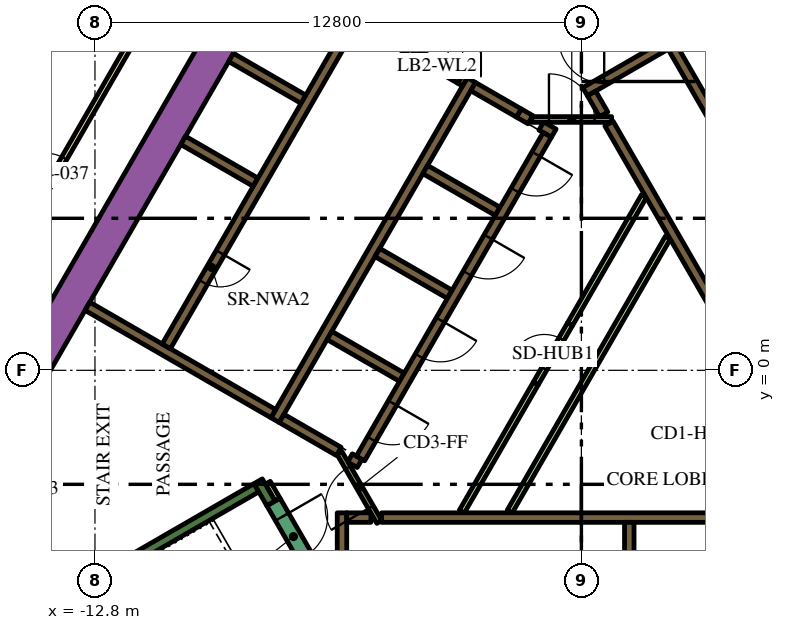
"""IFC4 building model, lengths in metres.
Left out: names, types, materials, properties, quantities, classifications, styles, units other than length and angle.
Written with IfcOpenShell. Run it as: python <this file> out.ifc"""

import sys

from ifc_helpers import new_model, si_unit, direction, frame, frame_2d, origin, place, context, subcontext, project, spatial, polyline, rectangle, outline, extrude, element, fill, save


model = new_model("IFC4")
c1 = context("Model", 3, precision=1e-05, world=origin(), true_north=direction((0.0, 1.0)))
c2 = subcontext(c1, "Body", "Model", "MODEL_VIEW")
j1 = project(units=[si_unit("LENGTHUNIT", "METRE"), si_unit("PLANEANGLEUNIT", "RADIAN")], contexts=[c1])
p1 = place(None, origin())
s1 = spatial("IfcSite", under=j1, at=p1, CompositionType="ELEMENT")
p2 = place(p1, origin())
s2 = spatial("IfcBuilding", under=s1, at=p2, CompositionType="ELEMENT")
p3 = place(p2, frame((0.0, 0.0, 66.6)))
s3 = spatial("IfcBuildingStorey", under=s2, at=p3, CompositionType="ELEMENT", Elevation=66.6)
p4 = place(p3, frame((-15.36, -1.503, 0.0), z_axis=(0.0, 0.0, 1.0), x_axis=(0.50000389221, 0.866023156604, 0.0)))
e1 = element("IfcWall", 1, at=p4, inside=s3, PredefinedType="SOLIDWALL", context=c2, shape_type="SweptSolid", body=[
    extrude(rectangle(XDim=21.0, YDim=0.9, at=frame_2d((10.5, 0.0))), origin(), (0.0, 0.0, 1.0), 3.9),
])
p5 = place(p3, frame((-12.134, -11.883, 0.0), z_axis=(0.0, 0.0, 1.0), x_axis=(-0.500005339912, 0.866022320763, 0.0)))
e2 = element("IfcWall", 2, at=p5, inside=s3, PredefinedType="SOLIDWALL", context=c2, shape_type="SweptSolid", body=[
    extrude(rectangle(XDim=9.488, YDim=0.9, at=frame_2d((4.744, 0.0))), origin(), (0.0, 0.0, 1.0), 3.9),
])
p6 = place(p3, frame((-14.44, -6.49, 0.0), z_axis=(0.0, 0.0, 1.0), x_axis=(0.866022966069, 0.500004222222, 0.0)))
e3 = element("IfcWall", 3, at=p6, inside=s3, PredefinedType="SOLIDWALL", context=c2, shape_type="SweptSolid", body=[
    extrude(rectangle(XDim=6.8, YDim=0.25, at=frame_2d((3.4, 0.0))), origin(), (0.0, 0.0, 1.0), 3.9),
])
p7 = place(p3, frame((-8.168, -3.503, 0.0), z_axis=(0.0, 0.0, 1.0), x_axis=(-0.499952099219, 0.866053057547, 0.0)))
e4 = element("IfcWall", 4, at=p7, inside=s3, PredefinedType="SOLIDWALL", context=c2, shape_type="SweptSolid", body=[
    extrude(rectangle(XDim=0.675, YDim=0.25, at=frame_2d((0.337, 0.0))), origin(), (0.0, 0.0, 1.0), 3.9),
])
p8 = place(p3, frame((-5.259, -3.875, 0.0), z_axis=(0.0, 0.0, 1.0), x_axis=(1.0, 0.0, 0.0)))
e5 = element("IfcWall", 5, at=p8, inside=s3, PredefinedType="SOLIDWALL", context=c2, shape_type="SweptSolid", body=[
    extrude(rectangle(XDim=10.489, YDim=0.25, at=frame_2d((5.244, 0.0))), origin(), (0.0, 0.0, 1.0), 3.9),
])
p9 = place(p3, frame((1.26, -4.0, 0.0), z_axis=(0.0, 0.0, 1.0), x_axis=(0.0, -1.0, 0.0)))
e6 = element("IfcWall", 6, at=p9, inside=s3, PredefinedType="SOLIDWALL", context=c2, shape_type="SweptSolid", body=[
    extrude(rectangle(XDim=2.2, YDim=0.25, at=frame_2d((1.1, 0.0))), origin(), (0.0, 0.0, 1.0), 3.9),
])
p10 = place(p3, frame((-6.3, -7.035, 0.0), z_axis=(0.0, 0.0, 1.0), x_axis=(0.0, 1.0, 0.0)))
e7 = element("IfcWall", 7, at=p10, inside=s3, PredefinedType="SOLIDWALL", context=c2, shape_type="SweptSolid", body=[
    extrude(rectangle(XDim=3.285, YDim=0.25, at=frame_2d((1.643, 0.0))), origin(), (0.0, 0.0, 1.0), 3.9),
])
p11 = place(p3, frame((-6.175, -3.875, 0.0), z_axis=(0.0, 0.0, 1.0), x_axis=(1.0, 0.0, 0.0)))
e8 = element("IfcWall", 8, at=p11, inside=s3, PredefinedType="SOLIDWALL", context=c2, shape_type="SweptSolid", body=[
    extrude(rectangle(XDim=0.637, YDim=0.25, at=frame_2d((0.318, 0.0))), origin(), (0.0, 0.0, 1.0), 3.9),
])
p12 = place(p3, frame((0.098, 7.331, 0.0), z_axis=(0.0, 0.0, 1.0), x_axis=(0.865988154826, 0.50006451154, 0.0)))
e9 = element("IfcWall", 9, at=p12, inside=s3, PredefinedType="SOLIDWALL", context=c2, shape_type="SweptSolid", body=[
    extrude(rectangle(XDim=3.398, YDim=0.25, at=frame_2d((1.699, 0.0))), origin(), (0.0, 0.0, 1.0), 3.9),
])
p13 = place(p3, frame((0.268, 7.285, 0.0), z_axis=(0.0, 0.0, 1.0), x_axis=(0.500098681536, -0.865968422476, 0.0)))
e10 = element("IfcWall", 10, at=p13, inside=s3, PredefinedType="SOLIDWALL", context=c2, shape_type="SweptSolid", body=[
    extrude(rectangle(XDim=0.636, YDim=0.25, at=frame_2d((0.318, 0.0))), origin(), (0.0, 0.0, 1.0), 3.9),
])
p14 = place(p3, frame((5.97, -2.591, 0.0), z_axis=(0.0, 0.0, 1.0), x_axis=(-0.499994469932, 0.866028596547, 0.0)))
e11 = element("IfcWall", 11, at=p14, inside=s3, PredefinedType="SOLIDWALL", context=c2, shape_type="SweptSolid", body=[
    extrude(rectangle(XDim=10.488, YDim=0.25, at=frame_2d((5.244, 0.0))), origin(), (0.0, 0.0, 1.0), 3.9),
])
p15 = place(p3, frame((-8.06, -1.311, 0.0), z_axis=(0.0, 0.0, 1.0), x_axis=(0.50000273126, 0.866023826885, 0.0)))
e12 = element("IfcWall", 12, at=p15, inside=s3, PredefinedType="SOLIDWALL", context=c2, shape_type="SweptSolid", body=[
    extrude(rectangle(XDim=10.33, YDim=0.25, at=frame_2d((5.165, 0.0))), origin(), (0.0, 0.0, 1.0), 3.9),
])
p16 = place(p3, frame((-1.342, 6.595, 0.0), z_axis=(0.0, 0.0, 1.0), x_axis=(-0.866046247233, 0.49996389635, 0.0)))
e13 = element("IfcWall", 13, at=p16, inside=s3, PredefinedType="SOLIDWALL", context=c2, shape_type="SweptSolid", body=[
    extrude(rectangle(XDim=0.35, YDim=0.25, at=frame_2d((0.175, 0.0))), origin(), (0.0, 0.0, 1.0), 3.9),
])
p17 = place(p3, frame((-1.647, 6.771, 0.0), z_axis=(0.0, 0.0, 1.0), x_axis=(-0.865971728693, 0.500092956464, 0.0)))
e14 = element("IfcWall", 14, at=p17, inside=s3, PredefinedType="SOLIDWALL", context=c2, shape_type="SweptSolid", body=[
    extrude(rectangle(XDim=1.388, YDim=0.25, at=frame_2d((0.694, 0.0))), origin(), (0.0, 0.0, 1.0), 3.9),
])
p18 = place(p3, frame((-0.728, 6.24, 0.0), z_axis=(0.0, 0.0, 1.0), x_axis=(-0.866088799389, 0.499890179513, 0.0)))
e15 = element("IfcWall", 15, at=p18, inside=s3, PredefinedType="SOLIDWALL", context=c2, shape_type="SweptSolid", body=[
    extrude(rectangle(XDim=0.378, YDim=0.25, at=frame_2d((0.189, 0.0))), origin(), (0.0, 0.0, 1.0), 3.9),
])
for number, where, z_axis, x_axis in (
    (16, (-2.204, 4.182, 0.0), (0.0, 0.0, 1.0), (-0.866, 0.5, 0.0)),
    (17, (-5.369, 3.1, 0.0), (0.0, 0.0, 1.0), (0.866, -0.5, 0.0)),
    (18, (-4.724, -0.182, 0.0), (0.0, 0.0, 1.0), (-0.866, 0.5, 0.0)),
):
    element("IfcWall", number, at=place(p3, frame(where, z_axis=z_axis, x_axis=x_axis)), inside=s3, PredefinedType="SOLIDWALL", context=c2, shape_type="SweptSolid", body=[
        extrude(rectangle(XDim=2.2, YDim=0.25, at=frame_2d((1.1, 0.0))), origin(), (0.0, 0.0, 1.0), 3.9),
    ])
p19 = place(p3, frame((-6.088, -2.305, 0.0), z_axis=(0.0, 0.0, 1.0), x_axis=(0.866059450854, -0.499941024108, 0.0)))
e19 = element("IfcWall", 19, at=p19, inside=s3, PredefinedType="SOLIDWALL", context=c2, shape_type="SweptSolid", body=[
    extrude(rectangle(XDim=0.29, YDim=0.25, at=frame_2d((0.145, 0.0))), origin(), (0.0, 0.0, 1.0), 3.9),
])
p20 = place(p3, frame((-7.889, -1.265, 0.0), z_axis=(0.0, 0.0, 1.0), x_axis=(0.865986741702, -0.500066958712, 0.0)))
e20 = element("IfcWall", 20, at=p20, inside=s3, PredefinedType="SOLIDWALL", context=c2, shape_type="SweptSolid", body=[
    extrude(rectangle(XDim=1.738, YDim=0.25, at=frame_2d((0.869, 0.0))), origin(), (0.0, 0.0, 1.0), 3.9),
])
p21 = place(p3, frame((-8.106, -1.14, 0.0), z_axis=(0.0, 0.0, 1.0), x_axis=(-0.866000643155, 0.500042884217, 0.0)))
e21 = element("IfcWall", 21, at=p21, inside=s3, PredefinedType="SOLIDWALL", context=c2, shape_type="SweptSolid", body=[
    extrude(rectangle(XDim=5.65, YDim=0.25, at=frame_2d((2.825, 0.0))), origin(), (0.0, 0.0, 1.0), 3.9),
])
p22 = place(p3, origin())
e22 = element("IfcWall", 22, at=p22, inside=s3, PredefinedType="SOLIDWALL", context=c2, shape_type="SweptSolid", body=[
    extrude(outline(polyline([(-3.128, 7.481), (-3.259, 7.557), (-3.134, 7.773), (-3.003, 7.698), (-3.128, 7.481)])), origin(), (0.0, 0.0, 1.0), 3.9),
])
for number, where, z_axis, x_axis in (
    (23, (-8.574, 4.95, 0.0), (0.0, 0.0, 1.0), (-0.866, 0.5, 0.0)),
    (24, (-7.314, 7.132, 0.0), (0.0, 0.0, 1.0), (-0.866, 0.5, 0.0)),
):
    element("IfcWall", number, at=place(p3, frame(where, z_axis=z_axis, x_axis=x_axis)), inside=s3, PredefinedType="SOLIDWALL", context=c2, shape_type="SweptSolid", body=[
        extrude(rectangle(XDim=2.2, YDim=0.25, at=frame_2d((1.1, 0.0))), origin(), (0.0, 0.0, 1.0), 3.9),
    ])
p23 = place(p3, frame((-7.959, 10.415, 0.0), z_axis=(0.0, 0.0, 1.0), x_axis=(0.866020958405, -0.500007699544, 0.0)))
e25 = element("IfcWall", 25, at=p23, inside=s3, PredefinedType="SOLIDWALL", context=c2, shape_type="SweptSolid", body=[
    extrude(rectangle(XDim=4.1, YDim=0.25, at=frame_2d((2.05, 0.0))), origin(), (0.0, 0.0, 1.0), 3.9),
])
p24 = place(p3, frame((-8.252, -2.958, 0.0), z_axis=(0.0, 0.0, 1.0), x_axis=(0.500174715838, -0.865924508047, 0.0)))
e26 = element("IfcWall", 26, at=p24, inside=s3, PredefinedType="PARTITIONING", context=c2, shape_type="SweptSolid", body=[
    extrude(rectangle(XDim=0.514, YDim=0.15, at=frame_2d((0.257, 0.0))), origin(), (0.0, 0.0, 1.0), 2.75),
])
p25 = place(p3, frame((-3.147, -3.718, 0.0), z_axis=(0.0, 0.0, 1.0), x_axis=(0.500010131483, 0.866019554291, 0.0)))
e27 = element("IfcWall", 27, at=p25, inside=s3, PredefinedType="PARTITIONING", context=c2, shape_type="SweptSolid", body=[
    extrude(rectangle(XDim=3.894, YDim=0.15, at=frame_2d((1.947, 0.0))), origin(), (0.0, 0.0, 1.0), 2.75),
])
p26 = place(p3, frame((-1.887, -3.718, 0.0), z_axis=(0.0, 0.0, 1.0), x_axis=(0.500005008002, 0.866022512394, 0.0)))
e28 = element("IfcWall", 28, at=p26, inside=s3, PredefinedType="PARTITIONING", context=c2, shape_type="SweptSolid", body=[
    extrude(rectangle(XDim=8.327, YDim=0.15, at=frame_2d((4.164, 0.0))), origin(), (0.0, 0.0, 1.0), 2.75),
])
p27 = place(p3, frame((-0.3, 1.212, 0.0), z_axis=(0.0, 0.0, 1.0), x_axis=(0.499963101113, 0.866046706318, 0.0)))
e29 = element("IfcWall", 29, at=p27, inside=s3, PredefinedType="PARTITIONING", context=c2, shape_type="SweptSolid", body=[
    extrude(rectangle(XDim=3.893, YDim=0.15, at=frame_2d((1.947, 0.0))), origin(), (0.0, 0.0, 1.0), 2.75),
])
p28 = place(p3, frame((8.565, -2.185, 0.0), z_axis=(0.0, 0.0, 1.0), x_axis=(-0.499997954832, 0.866026584559, 0.0)))
e30 = element("IfcWall", 30, at=p28, inside=s3, PredefinedType="SOLIDWALL", context=c2, shape_type="SweptSolid", body=[
    extrude(rectangle(XDim=12.35, YDim=0.25, at=frame_2d((6.175, 0.0))), origin(), (0.0, 0.0, 1.0), 3.9),
])
p29 = place(p28, frame((5.725, 0.0, 0.0)))
e31 = element("IfcOpeningElement", 31, at=p29, cuts=e30, PredefinedType="OPENING", context=c2, shape_type="SweptSolid", body=[
    extrude(rectangle(XDim=0.9, YDim=2.1, at=frame_2d((0.45, 1.05))), frame((0.0, 0.135, 0.0), z_axis=(0.0, -1.0, 0.0), x_axis=(1.0, 0.0, 0.0)), (0.0, 0.0, 1.0), 0.27),
])
p30 = place(p3, frame((-6.008, 9.144, 0.0), z_axis=(0.0, 0.0, 1.0), x_axis=(-0.500006956611, -0.866021387346, 0.0)))
e32 = element("IfcWall", 32, at=p30, inside=s3, PredefinedType="SOLIDWALL", context=c2, shape_type="SweptSolid", body=[
    extrude(rectangle(XDim=9.83, YDim=0.25, at=frame_2d((4.915, 0.0))), origin(), (0.0, 0.0, 1.0), 3.9),
])
p31 = place(p30, frame((6.985, 0.0, 0.0)))
e33 = element("IfcOpeningElement", 33, at=p31, cuts=e32, PredefinedType="OPENING", context=c2, shape_type="SweptSolid", body=[
    extrude(rectangle(XDim=0.9, YDim=2.1, at=frame_2d((0.45, 1.05))), frame((0.0, 0.135, 0.0), z_axis=(0.0, -1.0, 0.0), x_axis=(1.0, 0.0, 0.0)), (0.0, 0.0, 1.0), 0.27),
])
p32 = place(p3, frame((-0.898, 6.194, 0.0), z_axis=(0.0, 0.0, 1.0), x_axis=(-0.499996202215, -0.866027596426, 0.0)))
e34 = element("IfcWall", 34, at=p32, inside=s3, PredefinedType="SOLIDWALL", context=c2, shape_type="SweptSolid", body=[
    extrude(rectangle(XDim=9.83, YDim=0.25, at=frame_2d((4.915, 0.0))), origin(), (0.0, 0.0, 1.0), 3.9),
])
p33 = place(p32, frame((0.585, 0.0, 0.0)))
e35 = element("IfcOpeningElement", 35, at=p33, cuts=e34, PredefinedType="OPENING", context=c2, shape_type="SweptSolid", body=[
    extrude(rectangle(XDim=1.1, YDim=2.1, at=frame_2d((0.55, 1.05))), frame((0.0, 0.135, 0.0), z_axis=(0.0, -1.0, 0.0), x_axis=(1.0, 0.0, 0.0)), (0.0, 0.0, 1.0), 0.27),
])
p34 = place(p32, frame((3.105, 0.0, 0.0)))
e36 = element("IfcOpeningElement", 36, at=p34, cuts=e34, PredefinedType="OPENING", context=c2, shape_type="SweptSolid", body=[
    extrude(rectangle(XDim=1.1, YDim=2.1, at=frame_2d((0.55, 1.05))), frame((0.0, 0.135, 0.0), z_axis=(0.0, -1.0, 0.0), x_axis=(1.0, 0.0, 0.0)), (0.0, 0.0, 1.0), 0.27),
])
p35 = place(p32, frame((5.625, 0.0, 0.0)))
e37 = element("IfcOpeningElement", 37, at=p35, cuts=e34, PredefinedType="OPENING", context=c2, shape_type="SweptSolid", body=[
    extrude(rectangle(XDim=1.1, YDim=2.1, at=frame_2d((0.55, 1.05))), frame((0.0, 0.135, 0.0), z_axis=(0.0, -1.0, 0.0), x_axis=(1.0, 0.0, 0.0)), (0.0, 0.0, 1.0), 0.27),
])
p36 = place(p32, frame((8.145, 0.0, 0.0)))
e38 = element("IfcOpeningElement", 38, at=p36, cuts=e34, PredefinedType="OPENING", context=c2, shape_type="SweptSolid", body=[
    extrude(rectangle(XDim=1.1, YDim=2.1, at=frame_2d((0.55, 1.05))), frame((0.0, 0.135, 0.0), z_axis=(0.0, -1.0, 0.0), x_axis=(1.0, 0.0, 0.0)), (0.0, 0.0, 1.0), 0.27),
])
p37 = place(p3, frame((-8.103, -3.466, 0.0), z_axis=(0.0, 0.0, 1.0), x_axis=(0.500078061341, -0.865980330357, 0.0)))
e39 = element("IfcWall", 39, at=p37, inside=s3, PredefinedType="SOLIDWALL", context=c2, shape_type="SweptSolid", body=[
    extrude(rectangle(XDim=2.1, YDim=0.4, at=frame_2d((1.05, 0.0))), origin(), (0.0, 0.0, 1.0), 3.9),
])
p38 = place(p37, frame((0.45, 0.0, 0.0)))
e40 = element("IfcOpeningElement", 40, at=p38, cuts=e39, PredefinedType="OPENING", context=c2, shape_type="SweptSolid", body=[
    extrude(rectangle(XDim=1.2, YDim=2.1, at=frame_2d((0.6, 1.05))), frame((0.0, 0.21, 0.0), z_axis=(0.0, -1.0, 0.0), x_axis=(1.0, 0.0, 0.0)), (0.0, 0.0, 1.0), 0.42),
])
p39 = place(p3, frame((-1.303, 6.6, 0.0), z_axis=(0.0, 0.0, 1.0), x_axis=(1.0, 0.0, 0.0)))
e41 = element("IfcWall", 41, at=p39, inside=s3, PredefinedType="PARTITIONING", context=c2, shape_type="SweptSolid", body=[
    extrude(rectangle(XDim=2.1, YDim=0.15, at=frame_2d((1.05, 0.0))), origin(), (0.0, 0.0, 1.0), 3.9),
])
p40 = place(p39, frame((0.45, 0.0, 0.0)))
e42 = element("IfcOpeningElement", 42, at=p40, cuts=e41, PredefinedType="OPENING", context=c2, shape_type="SweptSolid", body=[
    extrude(rectangle(XDim=1.2, YDim=2.1, at=frame_2d((0.6, 1.05))), frame((0.0, 0.085, 0.0), z_axis=(0.0, -1.0, 0.0), x_axis=(1.0, 0.0, 0.0)), (0.0, 0.0, 1.0), 0.17),
])
p41 = place(p3, frame((-5.317, -3.99, 0.0), z_axis=(0.0, 0.0, 1.0), x_axis=(-0.500027713859, 0.866009402589, 0.0)))
e43 = element("IfcWall", 43, at=p41, inside=s3, PredefinedType="PARTITIONING", context=c2, shape_type="SweptSolid", body=[
    extrude(rectangle(XDim=2.1, YDim=0.15, at=frame_2d((1.05, 0.0))), origin(), (0.0, 0.0, 1.0), 3.9),
])
p42 = place(p41, frame((0.45, 0.0, 0.0)))
e44 = element("IfcOpeningElement", 44, at=p42, cuts=e43, PredefinedType="OPENING", context=c2, shape_type="SweptSolid", body=[
    extrude(rectangle(XDim=1.2, YDim=2.1, at=frame_2d((0.6, 1.05))), frame((0.0, 0.085, 0.0), z_axis=(0.0, -1.0, 0.0), x_axis=(1.0, 0.0, 0.0)), (0.0, 0.0, 1.0), 0.17),
])
p43 = place(p3, frame((-4.409, 8.365, 0.0), z_axis=(0.0, 0.0, 1.0), x_axis=(0.866034573852, -0.49998411664, 0.0)))
e45 = element("IfcWall", 45, at=p43, inside=s3, PredefinedType="SOLIDWALL", context=c2, shape_type="SweptSolid", body=[
    extrude(rectangle(XDim=1.4, YDim=0.25, at=frame_2d((0.7, 0.0))), origin(), (0.0, 0.0, 1.0), 3.9),
])
p44 = place(p43, frame((0.1, 0.0, 0.0)))
e46 = element("IfcOpeningElement", 46, at=p44, cuts=e45, PredefinedType="OPENING", context=c2, shape_type="SweptSolid", body=[
    extrude(rectangle(XDim=1.2, YDim=2.1, at=frame_2d((0.6, 1.05))), frame((0.0, 0.135, 0.0), z_axis=(0.0, -1.0, 0.0), x_axis=(1.0, 0.0, 0.0)), (0.0, 0.0, 1.0), 0.27),
])
p45 = place(p3, frame((-1.2, -0.346, 0.0), z_axis=(0.0, 0.0, 1.0), x_axis=(0.499961193289, 0.866047807691, 0.0)))
e47 = element("IfcWall", 47, at=p45, inside=s3, PredefinedType="PARTITIONING", context=c2, shape_type="SweptSolid", body=[
    extrude(rectangle(XDim=1.8, YDim=0.15, at=frame_2d((0.9, 0.0))), origin(), (0.0, 0.0, 1.0), 2.75),
])
p46 = place(p45, frame((0.45, 0.0, 0.0)))
e48 = element("IfcOpeningElement", 48, at=p46, cuts=e47, PredefinedType="OPENING", context=c2, shape_type="SweptSolid", body=[
    extrude(rectangle(XDim=0.9, YDim=2.1, at=frame_2d((0.45, 1.05))), frame((0.0, 0.085, 0.0), z_axis=(0.0, -1.0, 0.0), x_axis=(1.0, 0.0, 0.0)), (0.0, 0.0, 1.0), 0.17),
])
p47 = place(p3, frame((-19.081, -3.9, 0.0), z_axis=(0.0, 0.0, 1.0), x_axis=(0.499998313975, 0.866026377209, 0.0)))
e49 = element("IfcWall", 49, at=p47, inside=s3, PredefinedType="PARTITIONING", context=c2, shape_type="SweptSolid", body=[
    extrude(rectangle(XDim=25.766, YDim=0.15, at=frame_2d((12.883, 0.0))), origin(), (0.0, 0.0, 1.0), 2.75),
])
p48 = place(p47, frame((24.586, 0.0, 0.0)))
e50 = element("IfcOpeningElement", 50, at=p48, cuts=e49, PredefinedType="OPENING", context=c2, shape_type="SweptSolid", body=[
    extrude(rectangle(XDim=1.0, YDim=2.1, at=frame_2d((0.5, 1.05))), frame((0.0, 0.085, 0.0), z_axis=(0.0, -1.0, 0.0), x_axis=(1.0, 0.0, 0.0)), (0.0, 0.0, 1.0), 0.17),
])
p49 = place(p47, frame((9.948, 0.0, 0.0)))
e51 = element("IfcOpeningElement", 51, at=p49, cuts=e49, PredefinedType="OPENING", context=c2, shape_type="SweptSolid", body=[
    extrude(rectangle(XDim=1.0, YDim=2.1, at=frame_2d((0.5, 1.05))), frame((0.0, 0.085, 0.0), z_axis=(0.0, -1.0, 0.0), x_axis=(1.0, 0.0, 0.0)), (0.0, 0.0, 1.0), 0.17),
])
p50 = place(p47, frame((7.782, 0.0, 0.0)))
e52 = element("IfcOpeningElement", 52, at=p50, cuts=e49, PredefinedType="OPENING", context=c2, shape_type="SweptSolid", body=[
    extrude(rectangle(XDim=0.9, YDim=2.1, at=frame_2d((0.45, 1.05))), frame((0.0, 0.085, 0.0), z_axis=(0.0, -1.0, 0.0), x_axis=(1.0, 0.0, 0.0)), (0.0, 0.0, 1.0), 0.17),
])
p51 = place(p47, frame((4.658, 0.0, 0.0)))
e53 = element("IfcOpeningElement", 53, at=p51, cuts=e49, PredefinedType="OPENING", context=c2, shape_type="SweptSolid", body=[
    extrude(rectangle(XDim=0.9, YDim=2.1, at=frame_2d((0.45, 1.05))), frame((0.0, 0.085, 0.0), z_axis=(0.0, -1.0, 0.0), x_axis=(1.0, 0.0, 0.0)), (0.0, 0.0, 1.0), 0.17),
])
p52 = place(p31, origin())
e54 = element("IfcDoor", 54, at=p52, inside=s3, OperationType="SINGLE_SWING_LEFT", PredefinedType="DOOR", context=c2, shape_type="SweptSolid", body=[
    extrude(rectangle(XDim=0.9, YDim=2.1, at=frame_2d((0.45, 1.05))), frame((0.0, 0.025, 0.0), z_axis=(0.0, -1.0, 0.0), x_axis=(1.0, 0.0, 0.0)), (0.0, 0.0, 1.0), 0.05),
])
fill(e33, e54)
p53 = place(p33, origin())
e55 = element("IfcDoor", 55, at=p53, inside=s3, OperationType="DOUBLE_DOOR_SLIDING", PredefinedType="DOOR", context=c2, shape_type="SweptSolid", body=[
    extrude(rectangle(XDim=1.1, YDim=2.1, at=frame_2d((0.55, 1.05))), frame((0.0, 0.025, 0.0), z_axis=(0.0, -1.0, 0.0), x_axis=(1.0, 0.0, 0.0)), (0.0, 0.0, 1.0), 0.05),
])
fill(e35, e55)
p54 = place(p34, origin())
e56 = element("IfcDoor", 56, at=p54, inside=s3, OperationType="DOUBLE_DOOR_SLIDING", PredefinedType="DOOR", context=c2, shape_type="SweptSolid", body=[
    extrude(rectangle(XDim=1.1, YDim=2.1, at=frame_2d((0.55, 1.05))), frame((0.0, 0.025, 0.0), z_axis=(0.0, -1.0, 0.0), x_axis=(1.0, 0.0, 0.0)), (0.0, 0.0, 1.0), 0.05),
])
fill(e36, e56)
p55 = place(p35, origin())
e57 = element("IfcDoor", 57, at=p55, inside=s3, OperationType="DOUBLE_DOOR_SLIDING", PredefinedType="DOOR", context=c2, shape_type="SweptSolid", body=[
    extrude(rectangle(XDim=1.1, YDim=2.1, at=frame_2d((0.55, 1.05))), frame((0.0, 0.025, 0.0), z_axis=(0.0, -1.0, 0.0), x_axis=(1.0, 0.0, 0.0)), (0.0, 0.0, 1.0), 0.05),
])
fill(e37, e57)
p56 = place(p36, origin())
e58 = element("IfcDoor", 58, at=p56, inside=s3, OperationType="DOUBLE_DOOR_SLIDING", PredefinedType="DOOR", context=c2, shape_type="SweptSolid", body=[
    extrude(rectangle(XDim=1.1, YDim=2.1, at=frame_2d((0.55, 1.05))), frame((0.0, 0.025, 0.0), z_axis=(0.0, -1.0, 0.0), x_axis=(1.0, 0.0, 0.0)), (0.0, 0.0, 1.0), 0.05),
])
fill(e38, e58)
p57 = place(p38, origin())
e59 = element("IfcDoor", 59, at=p57, inside=s3, OperationType="SINGLE_SWING_LEFT", PredefinedType="DOOR", context=c2, shape_type="SweptSolid", body=[
    extrude(rectangle(XDim=1.2, YDim=2.1, at=frame_2d((0.6, 1.05))), frame((0.0, 0.025, 0.0), z_axis=(0.0, -1.0, 0.0), x_axis=(1.0, 0.0, 0.0)), (0.0, 0.0, 1.0), 0.05),
])
fill(e40, e59)
p58 = place(p40, origin())
e60 = element("IfcDoor", 60, at=p58, inside=s3, OperationType="SINGLE_SWING_LEFT", PredefinedType="DOOR", context=c2, shape_type="SweptSolid", body=[
    extrude(rectangle(XDim=1.2, YDim=2.1, at=frame_2d((0.6, 1.05))), frame((0.0, 0.025, 0.0), z_axis=(0.0, -1.0, 0.0), x_axis=(1.0, 0.0, 0.0)), (0.0, 0.0, 1.0), 0.05),
])
fill(e42, e60)
p59 = place(p42, origin())
e61 = element("IfcDoor", 61, at=p59, inside=s3, OperationType="SINGLE_SWING_LEFT", PredefinedType="DOOR", context=c2, shape_type="SweptSolid", body=[
    extrude(rectangle(XDim=1.2, YDim=2.1, at=frame_2d((0.6, 1.05))), frame((0.0, 0.025, 0.0), z_axis=(0.0, -1.0, 0.0), x_axis=(1.0, 0.0, 0.0)), (0.0, 0.0, 1.0), 0.05),
])
fill(e44, e61)
p60 = place(p44, origin())
e62 = element("IfcDoor", 62, at=p60, inside=s3, OperationType="SINGLE_SWING_LEFT", PredefinedType="DOOR", context=c2, shape_type="SweptSolid", body=[
    extrude(rectangle(XDim=1.2, YDim=2.1, at=frame_2d((0.6, 1.05))), frame((0.0, 0.025, 0.0), z_axis=(0.0, -1.0, 0.0), x_axis=(1.0, 0.0, 0.0)), (0.0, 0.0, 1.0), 0.05),
])
fill(e46, e62)
p61 = place(p46, origin())
e63 = element("IfcDoor", 63, at=p61, inside=s3, OperationType="SINGLE_SWING_LEFT", PredefinedType="DOOR", context=c2, shape_type="SweptSolid", body=[
    extrude(rectangle(XDim=0.9, YDim=2.1, at=frame_2d((0.45, 1.05))), frame((0.0, 0.025, 0.0), z_axis=(0.0, -1.0, 0.0), x_axis=(1.0, 0.0, 0.0)), (0.0, 0.0, 1.0), 0.05),
])
fill(e48, e63)
p62 = place(p49, origin())
e64 = element("IfcDoor", 64, at=p62, inside=s3, OperationType="SINGLE_SWING_LEFT", PredefinedType="DOOR", context=c2, shape_type="SweptSolid", body=[
    extrude(rectangle(XDim=1.0, YDim=2.1, at=frame_2d((0.5, 1.05))), frame((0.0, 0.025, 0.0), z_axis=(0.0, -1.0, 0.0), x_axis=(1.0, 0.0, 0.0)), (0.0, 0.0, 1.0), 0.05),
])
fill(e51, e64)
save(model, sys.argv[1])
